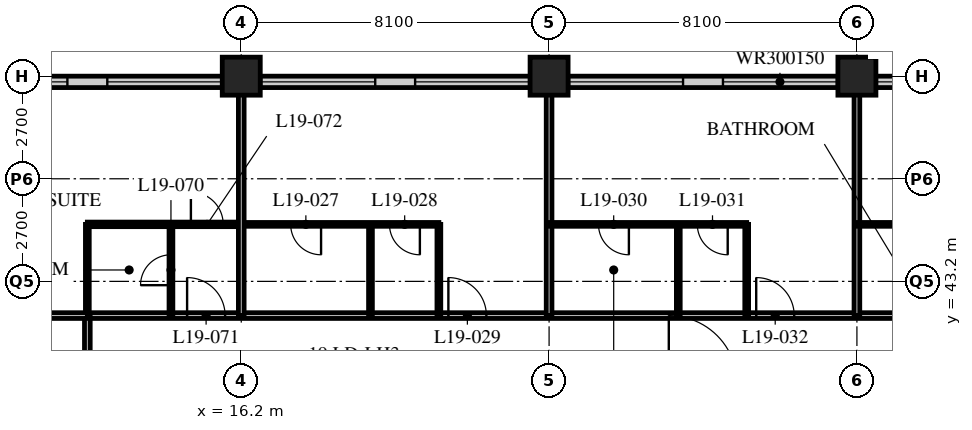
"""IFC4 building model, lengths in metres.
Left out: names, types, materials, properties, quantities, classifications, styles, units other than length and angle.
Written with IfcOpenShell. Run it as: python <this file> out.ifc"""

import sys

from ifc_helpers import new_model, si_unit, direction, frame, frame_2d, origin, origin_2d, place, context, subcontext, project, spatial, rectangle, hollow_rectangle, extrude, element, fill, save


model = new_model("IFC4")
c1 = context("Model", 3, precision=1e-05, world=origin(), true_north=direction((0.0, 1.0)))
c2 = subcontext(c1, "Body", "Model", "MODEL_VIEW")
j1 = project(units=[si_unit("LENGTHUNIT", "METRE"), si_unit("PLANEANGLEUNIT", "RADIAN")], contexts=[c1])
p1 = place(None, origin())
s1 = spatial("IfcSite", under=j1, at=p1, CompositionType="ELEMENT")
p2 = place(p1, origin())
s2 = spatial("IfcBuilding", under=s1, at=p2, CompositionType="ELEMENT")
p3 = place(p2, frame((0.0, 0.0, 77.2)))
s3 = spatial("IfcBuildingStorey", under=s2, at=p3, CompositionType="ELEMENT", Elevation=77.2)
for number, where, z_axis, x_axis in (
    (1, (16.2, 48.6, 0.0), (0.0, 0.0, 1.0), (1.0, 0.0, 0.0)),
    (2, (24.3, 48.6, 0.0), (0.0, 0.0, 1.0), (1.0, 0.0, 0.0)),
    (3, (32.4, 48.6, 0.0), (0.0, 0.0, 1.0), (1.0, 0.0, 0.0)),
):
    element("IfcColumn", number, at=place(p3, frame(where, z_axis=z_axis, x_axis=x_axis)), inside=s3, PredefinedType="COLUMN", context=c2, shape_type="SweptSolid", body=[
        extrude(hollow_rectangle(XDim=1.0, YDim=1.0, WallThickness=0.1, at=origin_2d()), origin(), (0.0, 0.0, 1.0), 3.4),
    ])
p4 = place(p3, frame((48.3, 48.45, 0.0), z_axis=(0.0, 0.0, 1.0), x_axis=(-1.0, 0.0, 0.0)))
e4 = element("IfcWall", 4, at=p4, inside=s3, PredefinedType="SOLIDWALL", context=c2, shape_type="SweptSolid", body=[
    extrude(rectangle(XDim=40.2, YDim=0.3, at=frame_2d((20.1, 0.0))), origin(), (0.0, 0.0, 1.0), 3.19),
])
p5 = place(p4, frame((0.225, 0.0, 0.9)))
e5 = element("IfcOpeningElement", 5, at=p5, cuts=e4, PredefinedType="OPENING", context=c2, shape_type="SweptSolid", body=[
    extrude(rectangle(XDim=3.0, YDim=1.5, at=frame_2d((1.5, 0.75))), frame((0.0, 0.16, 0.0), z_axis=(0.0, -1.0, 0.0), x_axis=(1.0, 0.0, 0.0)), (0.0, 0.0, 1.0), 0.32),
])
p6 = place(p4, frame((4.275, 0.0, 0.9)))
e6 = element("IfcOpeningElement", 6, at=p6, cuts=e4, PredefinedType="OPENING", context=c2, shape_type="SweptSolid", body=[
    extrude(rectangle(XDim=3.0, YDim=1.5, at=frame_2d((1.5, 0.75))), frame((0.0, 0.16, 0.0), z_axis=(0.0, -1.0, 0.0), x_axis=(1.0, 0.0, 0.0)), (0.0, 0.0, 1.0), 0.32),
])
p7 = place(p4, frame((8.325, 0.0, 0.9)))
e7 = element("IfcOpeningElement", 7, at=p7, cuts=e4, PredefinedType="OPENING", context=c2, shape_type="SweptSolid", body=[
    extrude(rectangle(XDim=3.0, YDim=1.5, at=frame_2d((1.5, 0.75))), frame((0.0, 0.16, 0.0), z_axis=(0.0, -1.0, 0.0), x_axis=(1.0, 0.0, 0.0)), (0.0, 0.0, 1.0), 0.32),
])
p8 = place(p4, frame((12.375, 0.0, 0.9)))
e8 = element("IfcOpeningElement", 8, at=p8, cuts=e4, PredefinedType="OPENING", context=c2, shape_type="SweptSolid", body=[
    extrude(rectangle(XDim=3.0, YDim=1.5, at=frame_2d((1.5, 0.75))), frame((0.0, 0.16, 0.0), z_axis=(0.0, -1.0, 0.0), x_axis=(1.0, 0.0, 0.0)), (0.0, 0.0, 1.0), 0.32),
])
p9 = place(p4, frame((16.425, 0.0, 0.9)))
e9 = element("IfcOpeningElement", 9, at=p9, cuts=e4, PredefinedType="OPENING", context=c2, shape_type="SweptSolid", body=[
    extrude(rectangle(XDim=3.0, YDim=1.5, at=frame_2d((1.5, 0.75))), frame((0.0, 0.16, 0.0), z_axis=(0.0, -1.0, 0.0), x_axis=(1.0, 0.0, 0.0)), (0.0, 0.0, 1.0), 0.32),
])
p10 = place(p4, frame((20.475, 0.0, 0.9)))
e10 = element("IfcOpeningElement", 10, at=p10, cuts=e4, PredefinedType="OPENING", context=c2, shape_type="SweptSolid", body=[
    extrude(rectangle(XDim=3.0, YDim=1.5, at=frame_2d((1.5, 0.75))), frame((0.0, 0.16, 0.0), z_axis=(0.0, -1.0, 0.0), x_axis=(1.0, 0.0, 0.0)), (0.0, 0.0, 1.0), 0.32),
])
p11 = place(p4, frame((24.525, 0.0, 0.9)))
e11 = element("IfcOpeningElement", 11, at=p11, cuts=e4, PredefinedType="OPENING", context=c2, shape_type="SweptSolid", body=[
    extrude(rectangle(XDim=3.0, YDim=1.5, at=frame_2d((1.5, 0.75))), frame((0.0, 0.16, 0.0), z_axis=(0.0, -1.0, 0.0), x_axis=(1.0, 0.0, 0.0)), (0.0, 0.0, 1.0), 0.32),
])
p12 = place(p4, frame((28.575, 0.0, 0.9)))
e12 = element("IfcOpeningElement", 12, at=p12, cuts=e4, PredefinedType="OPENING", context=c2, shape_type="SweptSolid", body=[
    extrude(rectangle(XDim=3.0, YDim=1.5, at=frame_2d((1.5, 0.75))), frame((0.0, 0.16, 0.0), z_axis=(0.0, -1.0, 0.0), x_axis=(1.0, 0.0, 0.0)), (0.0, 0.0, 1.0), 0.32),
])
p13 = place(p4, frame((32.625, 0.0, 0.9)))
e13 = element("IfcOpeningElement", 13, at=p13, cuts=e4, PredefinedType="OPENING", context=c2, shape_type="SweptSolid", body=[
    extrude(rectangle(XDim=3.0, YDim=1.5, at=frame_2d((1.5, 0.75))), frame((0.0, 0.16, 0.0), z_axis=(0.0, -1.0, 0.0), x_axis=(1.0, 0.0, 0.0)), (0.0, 0.0, 1.0), 0.32),
])
p14 = place(p4, frame((36.675, 0.0, 0.9)))
e14 = element("IfcOpeningElement", 14, at=p14, cuts=e4, PredefinedType="OPENING", context=c2, shape_type="SweptSolid", body=[
    extrude(rectangle(XDim=3.0, YDim=1.5, at=frame_2d((1.5, 0.75))), frame((0.0, 0.16, 0.0), z_axis=(0.0, -1.0, 0.0), x_axis=(1.0, 0.0, 0.0)), (0.0, 0.0, 1.0), 0.32),
])
p15 = place(p3, frame((12.15, 42.3, 0.0), z_axis=(0.0, 0.0, 1.0), x_axis=(1.0, 0.0, 0.0)))
e15 = element("IfcWall", 15, at=p15, inside=s3, PredefinedType="PARTITIONING", context=c2, shape_type="SweptSolid", body=[
    extrude(rectangle(XDim=36.45, YDim=0.15, at=frame_2d((18.225, 0.0))), origin(), (0.0, 0.0, 1.0), 3.19),
])
p16 = place(p15, frame((9.5, 0.0, 0.0)))
e16 = element("IfcOpeningElement", 16, at=p16, cuts=e15, PredefinedType="OPENING", context=c2, shape_type="SweptSolid", body=[
    extrude(rectangle(XDim=1.0, YDim=2.1, at=frame_2d((0.5, 1.05))), frame((0.0, 0.085, 0.0), z_axis=(0.0, -1.0, 0.0), x_axis=(1.0, 0.0, 0.0)), (0.0, 0.0, 1.0), 0.17),
])
p17 = place(p15, frame((17.6, 0.0, 0.0)))
e17 = element("IfcOpeningElement", 17, at=p17, cuts=e15, PredefinedType="OPENING", context=c2, shape_type="SweptSolid", body=[
    extrude(rectangle(XDim=1.0, YDim=2.1, at=frame_2d((0.5, 1.05))), frame((0.0, 0.085, 0.0), z_axis=(0.0, -1.0, 0.0), x_axis=(1.0, 0.0, 0.0)), (0.0, 0.0, 1.0), 0.17),
])
p18 = place(p15, frame((22.7, 0.0, 0.0)))
e18 = element("IfcOpeningElement", 18, at=p18, cuts=e15, PredefinedType="OPENING", context=c2, shape_type="SweptSolid", body=[
    extrude(rectangle(XDim=1.0, YDim=2.1, at=frame_2d((0.5, 1.05))), frame((0.0, 0.085, 0.0), z_axis=(0.0, -1.0, 0.0), x_axis=(1.0, 0.0, 0.0)), (0.0, 0.0, 1.0), 0.17),
])
p19 = place(p15, frame((26.75, 0.0, 0.0)))
e19 = element("IfcOpeningElement", 19, at=p19, cuts=e15, PredefinedType="OPENING", context=c2, shape_type="SweptSolid", body=[
    extrude(rectangle(XDim=1.0, YDim=2.1, at=frame_2d((0.5, 1.05))), frame((0.0, 0.085, 0.0), z_axis=(0.0, -1.0, 0.0), x_axis=(1.0, 0.0, 0.0)), (0.0, 0.0, 1.0), 0.17),
])
p20 = place(p15, frame((30.8, 0.0, 0.0)))
e20 = element("IfcOpeningElement", 20, at=p20, cuts=e15, PredefinedType="OPENING", context=c2, shape_type="SweptSolid", body=[
    extrude(rectangle(XDim=1.0, YDim=2.1, at=frame_2d((0.5, 1.05))), frame((0.0, 0.085, 0.0), z_axis=(0.0, -1.0, 0.0), x_axis=(1.0, 0.0, 0.0)), (0.0, 0.0, 1.0), 0.17),
])
p21 = place(p15, frame((32.825, 0.0, 0.0)))
e21 = element("IfcOpeningElement", 21, at=p21, cuts=e15, PredefinedType="OPENING", context=c2, shape_type="SweptSolid", body=[
    extrude(rectangle(XDim=1.0, YDim=2.1, at=frame_2d((0.5, 1.05))), frame((0.0, 0.085, 0.0), z_axis=(0.0, -1.0, 0.0), x_axis=(1.0, 0.0, 0.0)), (0.0, 0.0, 1.0), 0.17),
])
p22 = place(p15, frame((2.625, 0.0, 0.0)))
e22 = element("IfcOpeningElement", 22, at=p22, cuts=e15, PredefinedType="OPENING", context=c2, shape_type="SweptSolid", body=[
    extrude(rectangle(XDim=1.0, YDim=2.1, at=frame_2d((0.5, 1.05))), frame((0.0, 0.085, 0.0), z_axis=(0.0, -1.0, 0.0), x_axis=(1.0, 0.0, 0.0)), (0.0, 0.0, 1.0), 0.17),
])
p23 = place(p3, frame((12.15, 16.2, 0.0), z_axis=(0.0, 0.0, 1.0), x_axis=(0.0, 1.0, 0.0)))
e23 = element("IfcWall", 23, at=p23, inside=s3, PredefinedType="PARTITIONING", context=c2, shape_type="SweptSolid", body=[
    extrude(rectangle(XDim=26.1, YDim=0.15, at=frame_2d((13.05, 0.0))), origin(), (0.0, 0.0, 1.0), 3.19),
])
p24 = place(p23, frame((0.3, 0.0, 0.0)))
e24 = element("IfcOpeningElement", 24, at=p24, cuts=e23, PredefinedType="OPENING", context=c2, shape_type="SweptSolid", body=[
    extrude(rectangle(XDim=1.0, YDim=2.1, at=frame_2d((0.5, 1.05))), frame((0.0, 0.085, 0.0), z_axis=(0.0, -1.0, 0.0), x_axis=(1.0, 0.0, 0.0)), (0.0, 0.0, 1.0), 0.17),
])
p25 = place(p23, frame((6.5, 0.0, 0.0)))
e25 = element("IfcOpeningElement", 25, at=p25, cuts=e23, PredefinedType="OPENING", context=c2, shape_type="SweptSolid", body=[
    extrude(rectangle(XDim=1.0, YDim=2.1, at=frame_2d((0.5, 1.05))), frame((0.0, 0.085, 0.0), z_axis=(0.0, -1.0, 0.0), x_axis=(1.0, 0.0, 0.0)), (0.0, 0.0, 1.0), 0.17),
])
p26 = place(p23, frame((13.55, 0.0, 0.0)))
e26 = element("IfcOpeningElement", 26, at=p26, cuts=e23, PredefinedType="OPENING", context=c2, shape_type="SweptSolid", body=[
    extrude(rectangle(XDim=1.0, YDim=2.1, at=frame_2d((0.5, 1.05))), frame((0.0, 0.085, 0.0), z_axis=(0.0, -1.0, 0.0), x_axis=(1.0, 0.0, 0.0)), (0.0, 0.0, 1.0), 0.17),
])
p27 = place(p23, frame((21.65, 0.0, 0.0)))
e27 = element("IfcOpeningElement", 27, at=p27, cuts=e23, PredefinedType="OPENING", context=c2, shape_type="SweptSolid", body=[
    extrude(rectangle(XDim=1.0, YDim=2.1, at=frame_2d((0.5, 1.05))), frame((0.0, 0.085, 0.0), z_axis=(0.0, -1.0, 0.0), x_axis=(1.0, 0.0, 0.0)), (0.0, 0.0, 1.0), 0.17),
])
p28 = place(p3, frame((16.2, 44.7, 0.0), z_axis=(0.0, 0.0, 1.0), x_axis=(1.0, 0.0, 0.0)))
e28 = element("IfcWall", 28, at=p28, inside=s3, PredefinedType="PARTITIONING", context=c2, shape_type="SweptSolid", body=[
    extrude(rectangle(XDim=5.2, YDim=0.1, at=frame_2d((2.6, 0.0))), origin(), (0.0, 0.0, 1.0), 3.19),
])
p29 = place(p28, frame((1.3, 0.0, 0.0)))
e29 = element("IfcOpeningElement", 29, at=p29, cuts=e28, PredefinedType="OPENING", context=c2, shape_type="SweptSolid", body=[
    extrude(rectangle(XDim=0.8, YDim=2.1, at=frame_2d((0.4, 1.05))), frame((0.0, 0.06, 0.0), z_axis=(0.0, -1.0, 0.0), x_axis=(1.0, 0.0, 0.0)), (0.0, 0.0, 1.0), 0.12),
])
p30 = place(p28, frame((3.9, 0.0, 0.0)))
e30 = element("IfcOpeningElement", 30, at=p30, cuts=e28, PredefinedType="OPENING", context=c2, shape_type="SweptSolid", body=[
    extrude(rectangle(XDim=0.8, YDim=2.1, at=frame_2d((0.4, 1.05))), frame((0.0, 0.06, 0.0), z_axis=(0.0, -1.0, 0.0), x_axis=(1.0, 0.0, 0.0)), (0.0, 0.0, 1.0), 0.12),
])
for number, where, z_axis, x_axis in (
    (31, (19.6, 42.3, 0.0), (0.0, 0.0, 1.0), (0.0, 1.0, 0.0)),
    (32, (21.4, 42.3, 0.0), (0.0, 0.0, 1.0), (0.0, 1.0, 0.0)),
):
    element("IfcWall", number, at=place(p3, frame(where, z_axis=z_axis, x_axis=x_axis)), inside=s3, PredefinedType="PARTITIONING", context=c2, shape_type="SweptSolid", body=[
        extrude(rectangle(XDim=2.4, YDim=0.1, at=frame_2d((1.2, 0.0))), origin(), (0.0, 0.0, 1.0), 3.19),
    ])
p31 = place(p3, frame((24.3, 42.3, 0.0), z_axis=(0.0, 0.0, 1.0), x_axis=(0.0, 1.0, 0.0)))
e33 = element("IfcWall", 33, at=p31, inside=s3, PredefinedType="PARTITIONING", context=c2, shape_type="SweptSolid", body=[
    extrude(rectangle(XDim=6.0, YDim=0.15, at=frame_2d((3.0, 0.0))), origin(), (0.0, 0.0, 1.0), 2.428),
])
p32 = place(p3, frame((24.3, 44.7, 0.0), z_axis=(0.0, 0.0, 1.0), x_axis=(1.0, 0.0, 0.0)))
e34 = element("IfcWall", 34, at=p32, inside=s3, PredefinedType="PARTITIONING", context=c2, shape_type="SweptSolid", body=[
    extrude(rectangle(XDim=5.2, YDim=0.1, at=frame_2d((2.6, 0.0))), origin(), (0.0, 0.0, 1.0), 3.19),
])
p33 = place(p32, frame((1.3, 0.0, 0.0)))
e35 = element("IfcOpeningElement", 35, at=p33, cuts=e34, PredefinedType="OPENING", context=c2, shape_type="SweptSolid", body=[
    extrude(rectangle(XDim=0.8, YDim=2.1, at=frame_2d((0.4, 1.05))), frame((0.0, 0.06, 0.0), z_axis=(0.0, -1.0, 0.0), x_axis=(1.0, 0.0, 0.0)), (0.0, 0.0, 1.0), 0.12),
])
p34 = place(p32, frame((3.9, 0.0, 0.0)))
e36 = element("IfcOpeningElement", 36, at=p34, cuts=e34, PredefinedType="OPENING", context=c2, shape_type="SweptSolid", body=[
    extrude(rectangle(XDim=0.8, YDim=2.1, at=frame_2d((0.4, 1.05))), frame((0.0, 0.06, 0.0), z_axis=(0.0, -1.0, 0.0), x_axis=(1.0, 0.0, 0.0)), (0.0, 0.0, 1.0), 0.12),
])
for number, where, z_axis, x_axis in (
    (37, (27.7, 42.3, 0.0), (0.0, 0.0, 1.0), (0.0, 1.0, 0.0)),
    (38, (29.5, 42.3, 0.0), (0.0, 0.0, 1.0), (0.0, 1.0, 0.0)),
):
    element("IfcWall", number, at=place(p3, frame(where, z_axis=z_axis, x_axis=x_axis)), inside=s3, PredefinedType="PARTITIONING", context=c2, shape_type="SweptSolid", body=[
        extrude(rectangle(XDim=2.4, YDim=0.1, at=frame_2d((1.2, 0.0))), origin(), (0.0, 0.0, 1.0), 3.19),
    ])
p35 = place(p3, frame((32.4, 42.3, 0.0), z_axis=(0.0, 0.0, 1.0), x_axis=(0.0, 1.0, 0.0)))
e39 = element("IfcWall", 39, at=p35, inside=s3, PredefinedType="PARTITIONING", context=c2, shape_type="SweptSolid", body=[
    extrude(rectangle(XDim=6.0, YDim=0.15, at=frame_2d((3.0, 0.0))), origin(), (0.0, 0.0, 1.0), 2.428),
])
p36 = place(p3, frame((32.4, 44.7, 0.0), z_axis=(0.0, 0.0, 1.0), x_axis=(1.0, 0.0, 0.0)))
e40 = element("IfcWall", 40, at=p36, inside=s3, PredefinedType="PARTITIONING", context=c2, shape_type="SweptSolid", body=[
    extrude(rectangle(XDim=2.3, YDim=0.1, at=frame_2d((1.15, 0.0))), origin(), (0.0, 0.0, 1.0), 3.19),
])
p37 = place(p3, frame((12.15, 44.7, 0.0), z_axis=(0.0, 0.0, 1.0), x_axis=(1.0, 0.0, 0.0)))
e41 = element("IfcWall", 41, at=p37, inside=s3, PredefinedType="PARTITIONING", context=c2, shape_type="SweptSolid", body=[
    extrude(rectangle(XDim=4.05, YDim=0.12, at=frame_2d((2.025, 0.0))), origin(), (0.0, 0.0, 1.0), 3.19),
])
p38 = place(p37, frame((2.725, 0.0, 0.0)))
e42 = element("IfcOpeningElement", 42, at=p38, cuts=e41, PredefinedType="OPENING", context=c2, shape_type="SweptSolid", body=[
    extrude(rectangle(XDim=0.85, YDim=2.1, at=frame_2d((0.425, 1.05))), frame((0.0, 0.07, 0.0), z_axis=(0.0, -1.0, 0.0), x_axis=(1.0, 0.0, 0.0)), (0.0, 0.0, 1.0), 0.14),
])
p39 = place(p3, frame((14.35, 42.3, 0.0), z_axis=(0.0, 0.0, 1.0), x_axis=(0.0, 1.0, 0.0)))
e43 = element("IfcWall", 43, at=p39, inside=s3, PredefinedType="PARTITIONING", context=c2, shape_type="SweptSolid", body=[
    extrude(rectangle(XDim=2.4, YDim=0.1, at=frame_2d((1.2, 0.0))), origin(), (0.0, 0.0, 1.0), 3.19),
])
p40 = place(p39, frame((0.8, 0.0, 0.0)))
e44 = element("IfcOpeningElement", 44, at=p40, cuts=e43, PredefinedType="OPENING", context=c2, shape_type="SweptSolid", body=[
    extrude(rectangle(XDim=0.8, YDim=2.1, at=frame_2d((0.4, 1.05))), frame((0.0, 0.06, 0.0), z_axis=(0.0, -1.0, 0.0), x_axis=(1.0, 0.0, 0.0)), (0.0, 0.0, 1.0), 0.12),
])
p41 = place(p3, frame((12.15, 42.3, 0.0), z_axis=(0.0, 0.0, 1.0), x_axis=(0.0, 1.0, 0.0)))
e45 = element("IfcWall", 45, at=p41, inside=s3, PredefinedType="PARTITIONING", context=c2, shape_type="SweptSolid", body=[
    extrude(rectangle(XDim=2.4, YDim=0.1, at=frame_2d((1.2, 0.0))), origin(), (0.0, 0.0, 1.0), 3.19),
])
p42 = place(p3, frame((4.35, 42.3, 0.0), z_axis=(0.0, 0.0, 1.0), x_axis=(1.0, 0.0, 0.0)))
e46 = element("IfcWall", 46, at=p42, inside=s3, PredefinedType="PARTITIONING", context=c2, shape_type="SweptSolid", body=[
    extrude(rectangle(XDim=7.8, YDim=0.15, at=frame_2d((3.9, 0.0))), origin(), (0.0, 0.0, 1.0), 3.19),
])
p43 = place(p3, frame((16.2, 42.3, 0.0), z_axis=(0.0, 0.0, 1.0), x_axis=(0.0, 1.0, 0.0)))
e47 = element("IfcWall", 47, at=p43, inside=s3, PredefinedType="PARTITIONING", context=c2, shape_type="SweptSolid", body=[
    extrude(rectangle(XDim=6.0, YDim=0.15, at=frame_2d((3.0, 0.0))), origin(), (0.0, 0.0, 1.0), 2.428),
])
p44 = place(p8, origin())
e48 = element("IfcWindow", 48, at=p44, inside=s3, PartitioningType="SINGLE_PANEL", PredefinedType="WINDOW", context=c2, shape_type="SweptSolid", body=[
    extrude(rectangle(XDim=3.0, YDim=1.5, at=frame_2d((1.5, 0.75))), frame((0.0, 0.03, 0.0), z_axis=(0.0, -1.0, 0.0), x_axis=(1.0, 0.0, 0.0)), (0.0, 0.0, 1.0), 0.06),
])
fill(e8, e48)
p45 = place(p9, origin())
e49 = element("IfcWindow", 49, at=p45, inside=s3, PartitioningType="SINGLE_PANEL", PredefinedType="WINDOW", context=c2, shape_type="SweptSolid", body=[
    extrude(rectangle(XDim=3.0, YDim=1.5, at=frame_2d((1.5, 0.75))), frame((0.0, 0.03, 0.0), z_axis=(0.0, -1.0, 0.0), x_axis=(1.0, 0.0, 0.0)), (0.0, 0.0, 1.0), 0.06),
])
fill(e9, e49)
p46 = place(p10, origin())
e50 = element("IfcWindow", 50, at=p46, inside=s3, PartitioningType="SINGLE_PANEL", PredefinedType="WINDOW", context=c2, shape_type="SweptSolid", body=[
    extrude(rectangle(XDim=3.0, YDim=1.5, at=frame_2d((1.5, 0.75))), frame((0.0, 0.03, 0.0), z_axis=(0.0, -1.0, 0.0), x_axis=(1.0, 0.0, 0.0)), (0.0, 0.0, 1.0), 0.06),
])
fill(e10, e50)
p47 = place(p11, origin())
e51 = element("IfcWindow", 51, at=p47, inside=s3, PartitioningType="SINGLE_PANEL", PredefinedType="WINDOW", context=c2, shape_type="SweptSolid", body=[
    extrude(rectangle(XDim=3.0, YDim=1.5, at=frame_2d((1.5, 0.75))), frame((0.0, 0.03, 0.0), z_axis=(0.0, -1.0, 0.0), x_axis=(1.0, 0.0, 0.0)), (0.0, 0.0, 1.0), 0.06),
])
fill(e11, e51)
p48 = place(p12, origin())
e52 = element("IfcWindow", 52, at=p48, inside=s3, PartitioningType="SINGLE_PANEL", PredefinedType="WINDOW", context=c2, shape_type="SweptSolid", body=[
    extrude(rectangle(XDim=3.0, YDim=1.5, at=frame_2d((1.5, 0.75))), frame((0.0, 0.03, 0.0), z_axis=(0.0, -1.0, 0.0), x_axis=(1.0, 0.0, 0.0)), (0.0, 0.0, 1.0), 0.06),
])
fill(e12, e52)
p49 = place(p13, origin())
e53 = element("IfcWindow", 53, at=p49, inside=s3, PartitioningType="SINGLE_PANEL", PredefinedType="WINDOW", context=c2, shape_type="SweptSolid", body=[
    extrude(rectangle(XDim=3.0, YDim=1.5, at=frame_2d((1.5, 0.75))), frame((0.0, 0.03, 0.0), z_axis=(0.0, -1.0, 0.0), x_axis=(1.0, 0.0, 0.0)), (0.0, 0.0, 1.0), 0.06),
])
fill(e13, e53)
p50 = place(p14, origin())
e54 = element("IfcWindow", 54, at=p50, inside=s3, PartitioningType="SINGLE_PANEL", PredefinedType="WINDOW", context=c2, shape_type="SweptSolid", body=[
    extrude(rectangle(XDim=3.0, YDim=1.5, at=frame_2d((1.5, 0.75))), frame((0.0, 0.03, 0.0), z_axis=(0.0, -1.0, 0.0), x_axis=(1.0, 0.0, 0.0)), (0.0, 0.0, 1.0), 0.06),
])
fill(e14, e54)
p51 = place(p29, origin())
e55 = element("IfcDoor", 55, at=p51, inside=s3, OperationType="SINGLE_SWING_LEFT", PredefinedType="DOOR", context=c2, shape_type="SweptSolid", body=[
    extrude(rectangle(XDim=0.8, YDim=2.1, at=frame_2d((0.4, 1.05))), frame((0.0, 0.025, 0.0), z_axis=(0.0, -1.0, 0.0), x_axis=(1.0, 0.0, 0.0)), (0.0, 0.0, 1.0), 0.05),
])
fill(e29, e55)
p52 = place(p30, origin())
e56 = element("IfcDoor", 56, at=p52, inside=s3, OperationType="SINGLE_SWING_LEFT", PredefinedType="DOOR", context=c2, shape_type="SweptSolid", body=[
    extrude(rectangle(XDim=0.8, YDim=2.1, at=frame_2d((0.4, 1.05))), frame((0.0, 0.025, 0.0), z_axis=(0.0, -1.0, 0.0), x_axis=(1.0, 0.0, 0.0)), (0.0, 0.0, 1.0), 0.05),
])
fill(e30, e56)
p53 = place(p16, origin())
e57 = element("IfcDoor", 57, at=p53, inside=s3, OperationType="SINGLE_SWING_LEFT", PredefinedType="DOOR", context=c2, shape_type="SweptSolid", body=[
    extrude(rectangle(XDim=1.0, YDim=2.1, at=frame_2d((0.5, 1.05))), frame((0.0, 0.025, 0.0), z_axis=(0.0, -1.0, 0.0), x_axis=(1.0, 0.0, 0.0)), (0.0, 0.0, 1.0), 0.05),
])
fill(e16, e57)
p54 = place(p33, origin())
e58 = element("IfcDoor", 58, at=p54, inside=s3, OperationType="SINGLE_SWING_LEFT", PredefinedType="DOOR", context=c2, shape_type="SweptSolid", body=[
    extrude(rectangle(XDim=0.8, YDim=2.1, at=frame_2d((0.4, 1.05))), frame((0.0, 0.025, 0.0), z_axis=(0.0, -1.0, 0.0), x_axis=(1.0, 0.0, 0.0)), (0.0, 0.0, 1.0), 0.05),
])
fill(e35, e58)
p55 = place(p34, origin())
e59 = element("IfcDoor", 59, at=p55, inside=s3, OperationType="SINGLE_SWING_LEFT", PredefinedType="DOOR", context=c2, shape_type="SweptSolid", body=[
    extrude(rectangle(XDim=0.8, YDim=2.1, at=frame_2d((0.4, 1.05))), frame((0.0, 0.025, 0.0), z_axis=(0.0, -1.0, 0.0), x_axis=(1.0, 0.0, 0.0)), (0.0, 0.0, 1.0), 0.05),
])
fill(e36, e59)
p56 = place(p17, origin())
e60 = element("IfcDoor", 60, at=p56, inside=s3, OperationType="SINGLE_SWING_LEFT", PredefinedType="DOOR", context=c2, shape_type="SweptSolid", body=[
    extrude(rectangle(XDim=1.0, YDim=2.1, at=frame_2d((0.5, 1.05))), frame((0.0, 0.025, 0.0), z_axis=(0.0, -1.0, 0.0), x_axis=(1.0, 0.0, 0.0)), (0.0, 0.0, 1.0), 0.05),
])
fill(e17, e60)
p57 = place(p40, origin())
e61 = element("IfcDoor", 61, at=p57, inside=s3, OperationType="SINGLE_SWING_LEFT", PredefinedType="DOOR", context=c2, shape_type="SweptSolid", body=[
    extrude(rectangle(XDim=0.8, YDim=2.1, at=frame_2d((0.4, 1.05))), frame((0.0, 0.025, 0.0), z_axis=(0.0, -1.0, 0.0), x_axis=(1.0, 0.0, 0.0)), (0.0, 0.0, 1.0), 0.05),
])
fill(e44, e61)
p58 = place(p22, origin())
e62 = element("IfcDoor", 62, at=p58, inside=s3, OperationType="SINGLE_SWING_LEFT", PredefinedType="DOOR", context=c2, shape_type="SweptSolid", body=[
    extrude(rectangle(XDim=1.0, YDim=2.1, at=frame_2d((0.5, 1.05))), frame((0.0, 0.025, 0.0), z_axis=(0.0, -1.0, 0.0), x_axis=(1.0, 0.0, 0.0)), (0.0, 0.0, 1.0), 0.05),
])
fill(e22, e62)
p59 = place(p38, origin())
e63 = element("IfcDoor", 63, at=p59, inside=s3, OperationType="SINGLE_SWING_LEFT", PredefinedType="DOOR", context=c2, shape_type="SweptSolid", body=[
    extrude(rectangle(XDim=0.85, YDim=2.1, at=frame_2d((0.425, 1.05))), frame((0.0, 0.025, 0.0), z_axis=(0.0, -1.0, 0.0), x_axis=(1.0, 0.0, 0.0)), (0.0, 0.0, 1.0), 0.05),
])
fill(e42, e63)
save(model, sys.argv[1])
